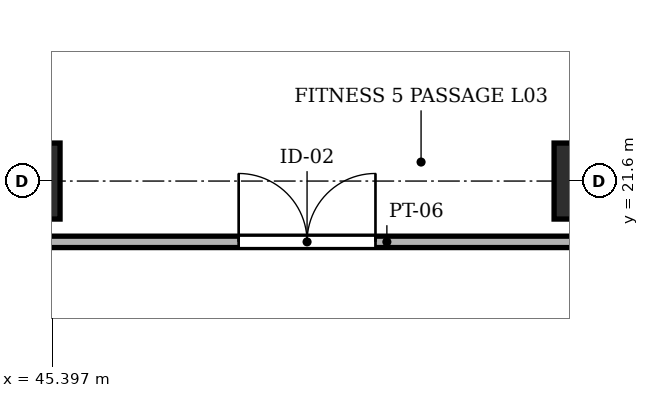
"""IFC4 building model, lengths in metres.
Left out: names, types, materials, properties, quantities, classifications, styles, units other than length and angle.
Written with IfcOpenShell. Run it as: python <this file> out.ifc"""

import sys

from ifc_helpers import new_model, si_unit, direction, frame, frame_2d, origin, origin_2d, place, context, subcontext, project, spatial, rectangle, extrude, element, fill, save


model = new_model("IFC4")
c1 = context("Model", 3, precision=1e-05, world=origin(), true_north=direction((0.0, 1.0)))
c2 = subcontext(c1, "Body", "Model", "MODEL_VIEW")
j1 = project(units=[si_unit("LENGTHUNIT", "METRE"), si_unit("PLANEANGLEUNIT", "RADIAN")], contexts=[c1])
p1 = place(None, origin())
s1 = spatial("IfcSite", under=j1, at=p1, CompositionType="ELEMENT")
p2 = place(p1, origin())
s2 = spatial("IfcBuilding", under=s1, at=p2, CompositionType="ELEMENT")
p3 = place(p2, frame((0.0, 0.0, 14.0)))
s3 = spatial("IfcBuildingStorey", under=s2, at=p3, CompositionType="ELEMENT", Elevation=14.0)
for number, where, z_axis, x_axis in (
    (1, (45.0, 21.6, -0.28), (0.0, 0.0, 1.0), (1.0, 0.0, 0.0)),
    (2, (52.5, 21.6, -0.28), (0.0, 0.0, 1.0), (1.0, 0.0, 0.0)),
):
    element("IfcColumn", number, at=place(p3, frame(where, z_axis=z_axis, x_axis=x_axis)), inside=s3, PredefinedType="COLUMN", context=c2, shape_type="SweptSolid", body=[
        extrude(rectangle(XDim=1.0, YDim=1.0, at=origin_2d()), origin(), (0.0, 0.0, 1.0), 9.93),
    ])
p4 = place(p3, frame((38.3, 20.8, 0.0), z_axis=(0.0, 0.0, 1.0), x_axis=(1.0, 0.0, 0.0)))
e3 = element("IfcWall", 3, at=p4, inside=s3, PredefinedType="PARTITIONING", context=c2, shape_type="SweptSolid", body=[
    extrude(rectangle(XDim=28.9, YDim=0.15, at=frame_2d((14.45, 0.0))), origin(), (0.0, 0.0, 1.0), 9.43),
])
p5 = place(p4, frame((9.55, 0.0, 0.0)))
e4 = element("IfcOpeningElement", 4, at=p5, cuts=e3, PredefinedType="OPENING", context=c2, shape_type="SweptSolid", body=[
    extrude(rectangle(XDim=1.8, YDim=2.25, at=frame_2d((0.9, 1.125))), frame((0.0, 0.087, 0.0), z_axis=(0.0, -1.0, 0.0), x_axis=(1.0, 0.0, 0.0)), (0.0, 0.0, 1.0), 0.174),
])
p6 = place(p5, origin())
e5 = element("IfcDoor", 5, at=p6, inside=s3, OperationType="DOUBLE_DOOR_SINGLE_SWING", PredefinedType="DOOR", context=c2, shape_type="SweptSolid", body=[
    extrude(rectangle(XDim=1.8, YDim=2.25, at=frame_2d((0.9, 1.125))), frame((0.0, 0.025, 0.0), z_axis=(0.0, -1.0, 0.0), x_axis=(1.0, 0.0, 0.0)), (0.0, 0.0, 1.0), 0.05),
])
fill(e4, e5)
save(model, sys.argv[1])
